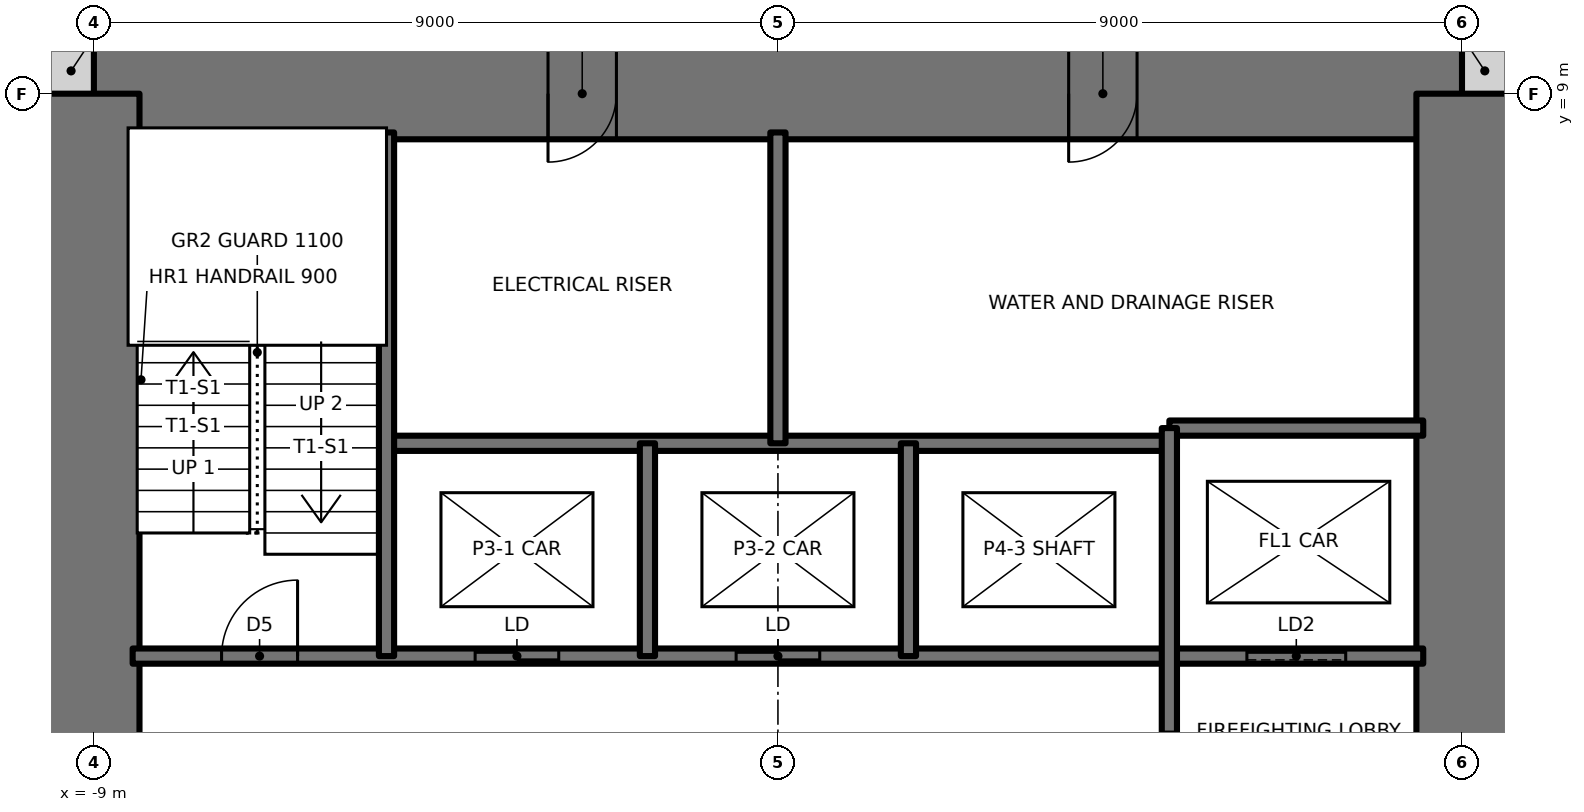
"""IFC4 building model, lengths in metres.
Left out: names, types, materials, properties, quantities, classifications, styles, units other than length and angle.
Written with IfcOpenShell. Run it as: python <this file> out.ifc"""

import sys

from ifc_helpers import new_model, si_unit, direction, frame, frame_2d, origin, place, context, subcontext, project, spatial, rectangle, extrude, element, fill, save


model = new_model("IFC4")
c1 = context("Model", 3, precision=1e-05, world=origin(), true_north=direction((0.0, 1.0)))
c2 = subcontext(c1, "Body", "Model", "MODEL_VIEW")
j1 = project(units=[si_unit("LENGTHUNIT", "METRE"), si_unit("PLANEANGLEUNIT", "RADIAN")], contexts=[c1])
p1 = place(None, origin())
s1 = spatial("IfcSite", under=j1, at=p1, CompositionType="ELEMENT")
p2 = place(p1, origin())
s2 = spatial("IfcBuilding", under=s1, at=p2, CompositionType="ELEMENT")
p3 = place(p2, frame((0.0, 0.0, 153.0)))
s3 = spatial("IfcBuildingStorey", under=s2, at=p3, CompositionType="ELEMENT", Elevation=153.0)
for number, where, z_axis, x_axis in (
    (1, (9.0, 9.3, 0.0), (0.0, 0.0, 1.0), (1.0, 0.0, 0.0)),
    (2, (-9.6, 9.3, 0.0), (0.0, 0.0, 1.0), (1.0, 0.0, 0.0)),
):
    element("IfcWall", number, at=place(p3, frame(where, z_axis=z_axis, x_axis=x_axis)), inside=s3, PredefinedType="SOLIDWALL", context=c2, shape_type="SweptSolid", body=[
        extrude(rectangle(XDim=0.6, YDim=0.6, at=frame_2d((0.3, 0.0))), origin(), (0.0, 0.0, 1.0), 3.5),
    ])
p4 = place(p3, frame((9.0, 9.0, 0.0), z_axis=(0.0, 0.0, 1.0), x_axis=(-1.0, 0.0, 0.0)))
e3 = element("IfcWall", 3, at=p4, inside=s3, PredefinedType="SHEAR", context=c2, shape_type="SweptSolid", body=[
    extrude(rectangle(XDim=18.0, YDim=1.2, at=frame_2d((9.0, 0.0))), origin(), (0.0, 0.0, 1.0), 3.5),
])
p5 = place(p4, frame((11.125, 0.0, 0.0)))
e4 = element("IfcOpeningElement", 4, at=p5, cuts=e3, PredefinedType="OPENING", context=c2, shape_type="SweptSolid", body=[
    extrude(rectangle(XDim=0.9, YDim=2.1, at=frame_2d((0.45, 1.05))), frame((0.0, 0.61, 0.0), z_axis=(0.0, -1.0, 0.0), x_axis=(1.0, 0.0, 0.0)), (0.0, 0.0, 1.0), 1.22),
])
p6 = place(p4, frame((4.275, 0.0, 0.0)))
e5 = element("IfcOpeningElement", 5, at=p6, cuts=e3, PredefinedType="OPENING", context=c2, shape_type="SweptSolid", body=[
    extrude(rectangle(XDim=0.9, YDim=2.1, at=frame_2d((0.45, 1.05))), frame((0.0, 0.61, 0.0), z_axis=(0.0, -1.0, 0.0), x_axis=(1.0, 0.0, 0.0)), (0.0, 0.0, 1.0), 1.22),
])
p7 = place(p3, frame((9.0, -9.0, 0.0), z_axis=(0.0, 0.0, 1.0), x_axis=(0.0, 1.0, 0.0)))
e6 = element("IfcWall", 6, at=p7, inside=s3, PredefinedType="SHEAR", context=c2, shape_type="SweptSolid", body=[
    extrude(rectangle(XDim=18.0, YDim=1.2, at=frame_2d((9.0, 0.0))), origin(), (0.0, 0.0, 1.0), 3.5),
])
p8 = place(p7, frame((8.5, 0.0, 0.0)))
e7 = element("IfcOpeningElement", 7, at=p8, cuts=e6, PredefinedType="OPENING", context=c2, shape_type="SweptSolid", body=[
    extrude(rectangle(XDim=1.0, YDim=2.1, at=frame_2d((0.5, 1.05))), frame((0.0, 0.61, 0.0), z_axis=(0.0, -1.0, 0.0), x_axis=(1.0, 0.0, 0.0)), (0.0, 0.0, 1.0), 1.22),
])
p9 = place(p3, frame((-9.0, 9.0, 0.0), z_axis=(0.0, 0.0, 1.0), x_axis=(0.0, -1.0, 0.0)))
e8 = element("IfcWall", 8, at=p9, inside=s3, PredefinedType="SHEAR", context=c2, shape_type="SweptSolid", body=[
    extrude(rectangle(XDim=18.0, YDim=1.2, at=frame_2d((9.0, 0.0))), origin(), (0.0, 0.0, 1.0), 3.5),
])
p10 = place(p9, frame((8.5, 0.0, 0.0)))
e9 = element("IfcOpeningElement", 9, at=p10, cuts=e8, PredefinedType="OPENING", context=c2, shape_type="SweptSolid", body=[
    extrude(rectangle(XDim=1.0, YDim=2.1, at=frame_2d((0.5, 1.05))), frame((0.0, 0.61, 0.0), z_axis=(0.0, -1.0, 0.0), x_axis=(1.0, 0.0, 0.0)), (0.0, 0.0, 1.0), 1.22),
])
p11 = place(p3, frame((-8.49, 1.6, 0.0), z_axis=(0.0, 0.0, 1.0), x_axis=(1.0, 0.0, 0.0)))
e10 = element("IfcWall", 10, at=p11, inside=s3, PredefinedType="SOLIDWALL", context=c2, shape_type="SweptSolid", body=[
    extrude(rectangle(XDim=16.98, YDim=0.2, at=frame_2d((8.49, 0.0))), origin(), (0.0, 0.0, 1.0), 3.5),
])
p12 = place(p11, frame((1.17, 0.0, 0.0)))
e11 = element("IfcOpeningElement", 11, at=p12, cuts=e10, PredefinedType="OPENING", context=c2, shape_type="SweptSolid", body=[
    extrude(rectangle(XDim=1.0, YDim=2.1, at=frame_2d((0.5, 1.05))), frame((0.0, 0.11, 0.0), z_axis=(0.0, -1.0, 0.0), x_axis=(1.0, 0.0, 0.0)), (0.0, 0.0, 1.0), 0.22),
])
p13 = place(p11, frame((4.506, 0.0, 0.0)))
e12 = element("IfcOpeningElement", 12, at=p13, cuts=e10, PredefinedType="OPENING", context=c2, shape_type="SweptSolid", body=[
    extrude(rectangle(XDim=1.1, YDim=2.1, at=frame_2d((0.55, 1.05))), frame((0.0, 0.11, 0.0), z_axis=(0.0, -1.0, 0.0), x_axis=(1.0, 0.0, 0.0)), (0.0, 0.0, 1.0), 0.22),
])
p14 = place(p11, frame((7.94, 0.0, 0.0)))
e13 = element("IfcOpeningElement", 13, at=p14, cuts=e10, PredefinedType="OPENING", context=c2, shape_type="SweptSolid", body=[
    extrude(rectangle(XDim=1.1, YDim=2.1, at=frame_2d((0.55, 1.05))), frame((0.0, 0.11, 0.0), z_axis=(0.0, -1.0, 0.0), x_axis=(1.0, 0.0, 0.0)), (0.0, 0.0, 1.0), 0.22),
])
p15 = place(p11, frame((14.66, 0.0, 0.0)))
e14 = element("IfcOpeningElement", 14, at=p15, cuts=e10, PredefinedType="OPENING", context=c2, shape_type="SweptSolid", body=[
    extrude(rectangle(XDim=1.3, YDim=2.1, at=frame_2d((0.65, 1.05))), frame((0.0, 0.11, 0.0), z_axis=(0.0, -1.0, 0.0), x_axis=(1.0, 0.0, 0.0)), (0.0, 0.0, 1.0), 0.22),
])
p16 = place(p3, frame((-5.15, 4.4, 0.0), z_axis=(0.0, 0.0, 1.0), x_axis=(1.0, 0.0, 0.0)))
e15 = element("IfcWall", 15, at=p16, inside=s3, PredefinedType="SOLIDWALL", context=c2, shape_type="SweptSolid", body=[
    extrude(rectangle(XDim=10.3, YDim=0.2, at=frame_2d((5.15, 0.0))), origin(), (0.0, 0.0, 1.0), 3.5),
])
p17 = place(p3, frame((5.15, 4.6, 0.0), z_axis=(0.0, 0.0, 1.0), x_axis=(1.0, 0.0, 0.0)))
e16 = element("IfcWall", 16, at=p17, inside=s3, PredefinedType="SOLIDWALL", context=c2, shape_type="SweptSolid", body=[
    extrude(rectangle(XDim=3.34, YDim=0.2, at=frame_2d((1.67, 0.0))), origin(), (0.0, 0.0, 1.0), 3.5),
])
p18 = place(p3, frame((5.15, -8.49, 0.0), z_axis=(0.0, 0.0, 1.0), x_axis=(0.0, 1.0, 0.0)))
e17 = element("IfcWall", 17, at=p18, inside=s3, PredefinedType="SOLIDWALL", context=c2, shape_type="SweptSolid", body=[
    extrude(rectangle(XDim=13.09, YDim=0.2, at=frame_2d((6.545, 0.0))), origin(), (0.0, 0.0, 1.0), 3.5),
])
p19 = place(p18, frame((7.89, 0.0, 0.0)))
e18 = element("IfcOpeningElement", 18, at=p19, cuts=e17, PredefinedType="OPENING", context=c2, shape_type="SweptSolid", body=[
    extrude(rectangle(XDim=1.2, YDim=2.1, at=frame_2d((0.6, 1.05))), frame((0.0, 0.11, 0.0), z_axis=(0.0, -1.0, 0.0), x_axis=(1.0, 0.0, 0.0)), (0.0, 0.0, 1.0), 0.22),
])
p20 = place(p3, frame((1.717, 1.6, 0.0), z_axis=(0.0, 0.0, 1.0), x_axis=(0.0, 1.0, 0.0)))
e19 = element("IfcWall", 19, at=p20, inside=s3, PredefinedType="SOLIDWALL", context=c2, shape_type="SweptSolid", body=[
    extrude(rectangle(XDim=2.8, YDim=0.2, at=frame_2d((1.4, 0.0))), origin(), (0.0, 0.0, 1.0), 3.5),
])
p21 = place(p3, frame((0.0, 4.4, 0.0), z_axis=(0.0, 0.0, 1.0), x_axis=(0.0, 1.0, 0.0)))
e20 = element("IfcWall", 20, at=p21, inside=s3, PredefinedType="SOLIDWALL", context=c2, shape_type="SweptSolid", body=[
    extrude(rectangle(XDim=4.09, YDim=0.2, at=frame_2d((2.045, 0.0))), origin(), (0.0, 0.0, 1.0), 3.5),
])
p22 = place(p3, frame((-1.717, 1.6, 0.0), z_axis=(0.0, 0.0, 1.0), x_axis=(0.0, 1.0, 0.0)))
e21 = element("IfcWall", 21, at=p22, inside=s3, PredefinedType="SOLIDWALL", context=c2, shape_type="SweptSolid", body=[
    extrude(rectangle(XDim=2.8, YDim=0.2, at=frame_2d((1.4, 0.0))), origin(), (0.0, 0.0, 1.0), 3.5),
])
p23 = place(p3, frame((-5.15, 1.6, 0.0), z_axis=(0.0, 0.0, 1.0), x_axis=(0.0, 1.0, 0.0)))
e22 = element("IfcWall", 22, at=p23, inside=s3, PredefinedType="SOLIDWALL", context=c2, shape_type="SweptSolid", body=[
    extrude(rectangle(XDim=6.89, YDim=0.2, at=frame_2d((3.445, 0.0))), origin(), (0.0, 0.0, 1.0), 3.5),
])
p24 = place(p12, origin())
e23 = element("IfcDoor", 23, at=p24, inside=s3, OperationType="SINGLE_SWING_RIGHT", PredefinedType="DOOR", context=c2, shape_type="SweptSolid", body=[
    extrude(rectangle(XDim=1.0, YDim=2.1, at=frame_2d((0.5, 1.05))), frame((0.0, 0.025, 0.0), z_axis=(0.0, -1.0, 0.0), x_axis=(1.0, 0.0, 0.0)), (0.0, 0.0, 1.0), 0.05),
])
fill(e11, e23)
p25 = place(p5, origin())
e24 = element("IfcDoor", 24, at=p25, inside=s3, OperationType="SINGLE_SWING_RIGHT", PredefinedType="DOOR", context=c2, shape_type="SweptSolid", body=[
    extrude(rectangle(XDim=0.9, YDim=2.1, at=frame_2d((0.45, 1.05))), frame((0.0, 0.025, 0.0), z_axis=(0.0, -1.0, 0.0), x_axis=(1.0, 0.0, 0.0)), (0.0, 0.0, 1.0), 0.05),
])
fill(e4, e24)
p26 = place(p6, origin())
e25 = element("IfcDoor", 25, at=p26, inside=s3, OperationType="SINGLE_SWING_RIGHT", PredefinedType="DOOR", context=c2, shape_type="SweptSolid", body=[
    extrude(rectangle(XDim=0.9, YDim=2.1, at=frame_2d((0.45, 1.05))), frame((0.0, 0.025, 0.0), z_axis=(0.0, -1.0, 0.0), x_axis=(1.0, 0.0, 0.0)), (0.0, 0.0, 1.0), 0.05),
])
fill(e5, e25)
p27 = place(p13, origin())
e26 = element("IfcDoor", 26, at=p27, inside=s3, OperationType="DOUBLE_DOOR_SLIDING", PredefinedType="DOOR", context=c2, shape_type="SweptSolid", body=[
    extrude(rectangle(XDim=1.1, YDim=2.1, at=frame_2d((0.55, 1.05))), frame((0.0, 0.025, 0.0), z_axis=(0.0, -1.0, 0.0), x_axis=(1.0, 0.0, 0.0)), (0.0, 0.0, 1.0), 0.05),
])
fill(e12, e26)
p28 = place(p14, origin())
e27 = element("IfcDoor", 27, at=p28, inside=s3, OperationType="DOUBLE_DOOR_SLIDING", PredefinedType="DOOR", context=c2, shape_type="SweptSolid", body=[
    extrude(rectangle(XDim=1.1, YDim=2.1, at=frame_2d((0.55, 1.05))), frame((0.0, 0.025, 0.0), z_axis=(0.0, -1.0, 0.0), x_axis=(1.0, 0.0, 0.0)), (0.0, 0.0, 1.0), 0.05),
])
fill(e13, e27)
p29 = place(p15, origin())
e28 = element("IfcDoor", 28, at=p29, inside=s3, OperationType="SLIDING_TO_LEFT", PredefinedType="DOOR", context=c2, shape_type="SweptSolid", body=[
    extrude(rectangle(XDim=1.3, YDim=2.1, at=frame_2d((0.65, 1.05))), frame((0.0, 0.025, 0.0), z_axis=(0.0, -1.0, 0.0), x_axis=(1.0, 0.0, 0.0)), (0.0, 0.0, 1.0), 0.05),
])
fill(e14, e28)
save(model, sys.argv[1])
